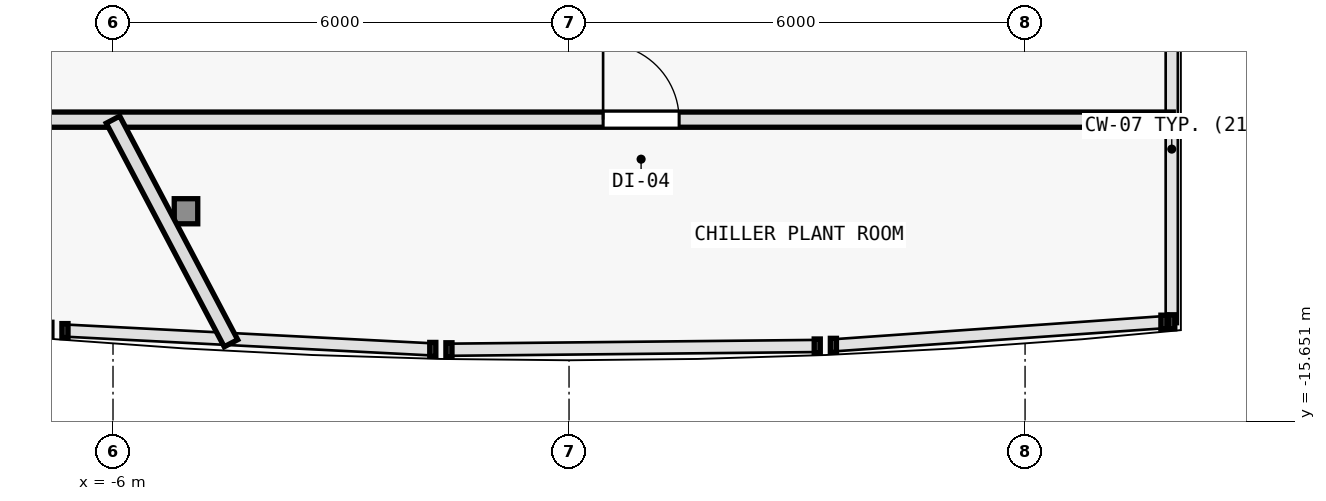
"""IFC4 building model, lengths in metres.
Left out: names, types, materials, properties, quantities, classifications, styles, units other than length and angle.
Written with IfcOpenShell. Run it as: python <this file> out.ifc"""

import sys

from ifc_helpers import new_model, si_unit, direction, frame, frame_2d, origin, origin_2d, place, context, subcontext, project, spatial, rectangle, i_section, extrude, element, fill, save


model = new_model("IFC4")
c1 = context("Model", 3, precision=1e-05, world=origin(), true_north=direction((0.0, 1.0)))
c2 = subcontext(c1, "Body", "Model", "MODEL_VIEW")
j1 = project(units=[si_unit("LENGTHUNIT", "METRE"), si_unit("PLANEANGLEUNIT", "RADIAN")], contexts=[c1])
p1 = place(None, origin())
s1 = spatial("IfcSite", under=j1, at=p1, CompositionType="ELEMENT")
p2 = place(p1, origin())
s2 = spatial("IfcBuilding", under=s1, at=p2, CompositionType="ELEMENT")
p3 = place(p2, frame((0.0, 0.0, 312.0)))
s3 = spatial("IfcBuildingStorey", under=s2, at=p3, CompositionType="ELEMENT", Elevation=312.0)
p4 = place(p3, frame((-5.04, -12.885, 0.0), z_axis=(0.0, 0.0, 1.0), x_axis=(1.0, 0.0, 0.0)))
e1 = element("IfcColumn", 1, at=p4, inside=s3, PredefinedType="COLUMN", context=c2, shape_type="SweptSolid", body=[
    extrude(i_section(OverallWidth=0.309, OverallDepth=0.33, WebThickness=0.011, FlangeThickness=0.019, FilletRadius=0.027, at=origin_2d()), origin(), (0.0, 0.0, 1.0), 3.6),
])
p5 = place(p3, frame((-10.18, -11.68, 0.0), z_axis=(0.0, 0.0, 1.0), x_axis=(1.0, 0.0, 0.0)))
e2 = element("IfcWall", 2, at=p5, inside=s3, PredefinedType="SOLIDWALL", context=c2, shape_type="SweptSolid", body=[
    extrude(rectangle(XDim=18.13, YDim=0.2, at=frame_2d((9.065, 0.0))), origin(), (0.0, 0.0, 1.0), 2.995),
])
p6 = place(p5, frame((10.628, 0.0, 0.0)))
e3 = element("IfcOpeningElement", 3, at=p6, cuts=e2, PredefinedType="OPENING", context=c2, shape_type="SweptSolid", body=[
    extrude(rectangle(XDim=1.0, YDim=2.15, at=frame_2d((0.5, 1.075))), frame((0.0, 0.11, 0.0), z_axis=(0.0, -1.0, 0.0), x_axis=(1.0, 0.0, 0.0)), (0.0, 0.0, 1.0), 0.22),
])
p7 = place(p3, frame((-4.448, -14.622, 0.0), z_axis=(0.0, 0.0, 1.0), x_axis=(-0.466632626592, 0.884451237661, 0.0)))
e4 = element("IfcWall", 4, at=p7, inside=s3, PredefinedType="SOLIDWALL", context=c2, shape_type="SweptSolid", body=[
    extrude(rectangle(XDim=3.326, YDim=0.2, at=frame_2d((1.663, 0.0))), origin(), (0.0, 0.0, 1.0), 2.995),
])
p8 = place(p6, origin())
e5 = element("IfcDoor", 5, at=p8, inside=s3, OperationType="SINGLE_SWING_LEFT", PredefinedType="DOOR", context=c2, shape_type="SweptSolid", body=[
    extrude(rectangle(XDim=1.0, YDim=2.15, at=frame_2d((0.5, 1.075))), frame((0.0, 0.025, 0.0), z_axis=(0.0, -1.0, 0.0), x_axis=(1.0, 0.0, 0.0)), (0.0, 0.0, 1.0), 0.05),
])
fill(e3, e5)
save(model, sys.argv[1])
